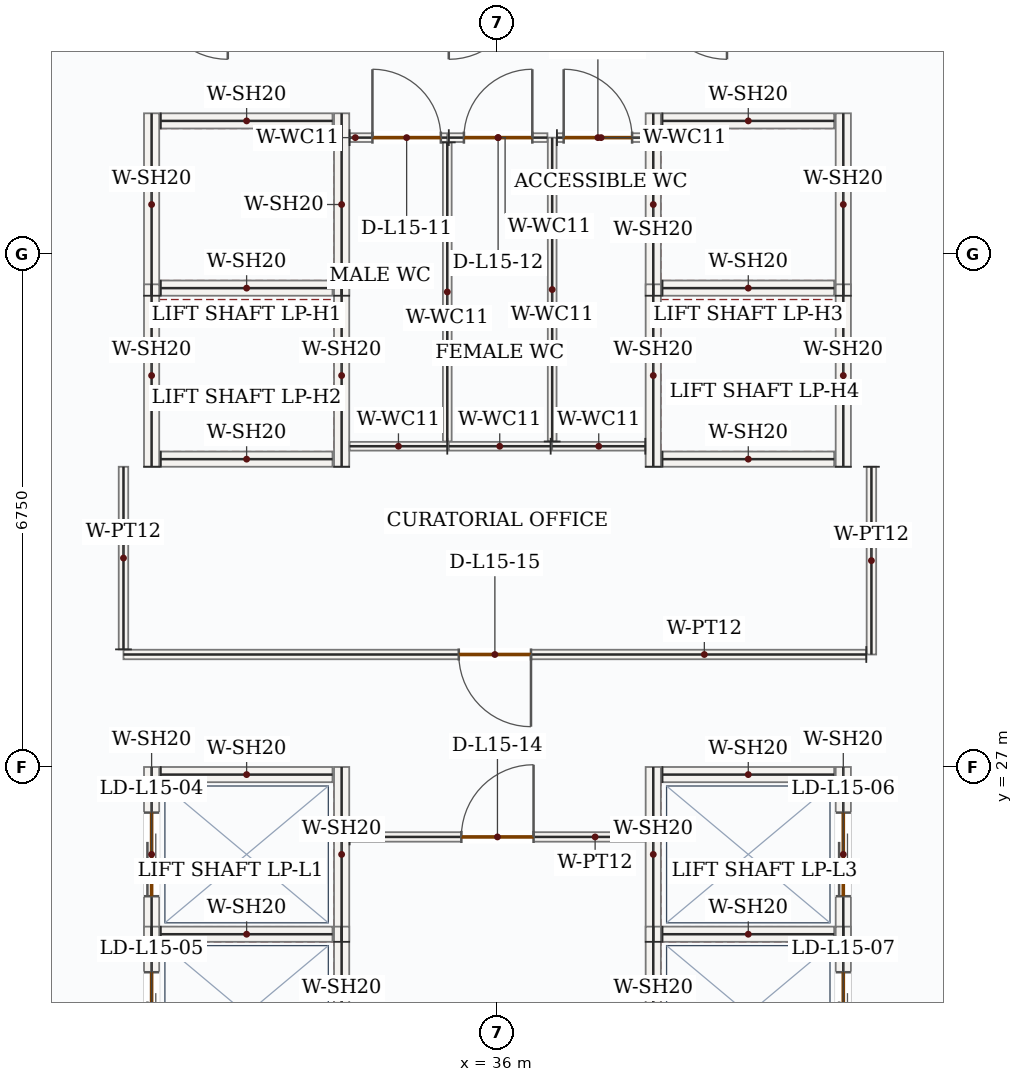
"""IFC4 building model, lengths in metres.
Left out: names, types, materials, properties, quantities, classifications, styles, units other than length and angle.
Written with IfcOpenShell. Run it as: python <this file> out.ifc"""

import sys

from ifc_helpers import new_model, si_unit, direction, frame, frame_2d, origin, place, context, subcontext, project, spatial, rectangle, extrude, source, transform, mapped, element, fill, save


model = new_model("IFC4")
c1 = context("Model", 3, precision=1e-05, world=origin(), true_north=direction((0.0, 1.0)))
c2 = subcontext(c1, "Body", "Model", "MODEL_VIEW")
j1 = project(units=[si_unit("LENGTHUNIT", "METRE"), si_unit("PLANEANGLEUNIT", "RADIAN")], contexts=[c1])
p1 = place(None, origin())
s1 = spatial("IfcSite", under=j1, at=p1, CompositionType="ELEMENT")
p2 = place(p1, origin())
s2 = spatial("IfcBuilding", under=s1, at=p2, CompositionType="ELEMENT")
p3 = place(p2, frame((0.0, 0.0, 71.1)))
s3 = spatial("IfcBuildingStorey", under=s2, at=p3, CompositionType="ELEMENT", Elevation=71.1)
m1 = source(origin(), c2, "Body", "SweptSolid", [
    extrude(rectangle(XDim=2.4, YDim=0.2, at=frame_2d((1.2, 0.0))), origin(), (0.0, 0.0, 1.0), 3.95),
])
for number, where, z_axis, x_axis in (
    (1, (31.45, 33.2, 0.0), (0.0, 0.0, 1.0), (0.0, 1.0, 0.0)),
    (2, (33.95, 33.2, 0.0), (0.0, 0.0, 1.0), (0.0, 1.0, 0.0)),
):
    element("IfcWall", number, at=place(p3, frame(where, z_axis=z_axis, x_axis=x_axis)), inside=s3, PredefinedType="SOLIDWALL", context=c2, shape_type="MappedRepresentation", body=[
        mapped(m1, transform((0.0, 0.0, 0.0), x_axis=(1.0, 0.0, 0.0), y_axis=(0.0, 1.0, 0.0), z_axis=(0.0, 0.0, 1.0), scale=1.0)),
    ])
m2 = source(origin(), c2, "Body", "SweptSolid", [
    extrude(rectangle(XDim=2.26, YDim=0.2, at=frame_2d((1.13, 0.0))), origin(), (0.0, 0.0, 1.0), 3.95),
])
for number, where, z_axis, x_axis in (
    (3, (31.57, 33.3, 0.0), (0.0, 0.0, 1.0), (1.0, 0.0, 0.0)),
    (4, (31.57, 35.5, 0.0), (0.0, 0.0, 1.0), (1.0, 0.0, 0.0)),
):
    element("IfcWall", number, at=place(p3, frame(where, z_axis=z_axis, x_axis=x_axis)), inside=s3, PredefinedType="SOLIDWALL", context=c2, shape_type="MappedRepresentation", body=[
        mapped(m2, transform((0.0, 0.0, 0.0), x_axis=(1.0, 0.0, 0.0), y_axis=(0.0, 1.0, 0.0), z_axis=(0.0, 0.0, 1.0), scale=1.0)),
    ])
for number, where, z_axis, x_axis in (
    (5, (31.45, 30.95, 0.0), (0.0, 0.0, 1.0), (0.0, 1.0, 0.0)),
    (6, (33.95, 30.95, 0.0), (0.0, 0.0, 1.0), (0.0, 1.0, 0.0)),
):
    element("IfcWall", number, at=place(p3, frame(where, z_axis=z_axis, x_axis=x_axis)), inside=s3, PredefinedType="SOLIDWALL", context=c2, shape_type="MappedRepresentation", body=[
        mapped(m1, transform((0.0, 0.0, 0.0), x_axis=(1.0, 0.0, 0.0), y_axis=(0.0, 1.0, 0.0), z_axis=(0.0, 0.0, 1.0), scale=1.0)),
    ])
p4 = place(p3, frame((31.57, 31.05, 0.0), z_axis=(0.0, 0.0, 1.0), x_axis=(1.0, 0.0, 0.0)))
e7 = element("IfcWall", 7, at=p4, inside=s3, PredefinedType="SOLIDWALL", context=c2, shape_type="MappedRepresentation", body=[
    mapped(m2, transform((0.0, 0.0, 0.0), x_axis=(1.0, 0.0, 0.0), y_axis=(0.0, 1.0, 0.0), z_axis=(0.0, 0.0, 1.0), scale=1.0)),
])
for number, where, z_axis, x_axis in (
    (8, (38.05, 33.2, 0.0), (0.0, 0.0, 1.0), (0.0, 1.0, 0.0)),
    (9, (40.55, 33.2, 0.0), (0.0, 0.0, 1.0), (0.0, 1.0, 0.0)),
):
    element("IfcWall", number, at=place(p3, frame(where, z_axis=z_axis, x_axis=x_axis)), inside=s3, PredefinedType="SOLIDWALL", context=c2, shape_type="MappedRepresentation", body=[
        mapped(m1, transform((0.0, 0.0, 0.0), x_axis=(1.0, 0.0, 0.0), y_axis=(0.0, 1.0, 0.0), z_axis=(0.0, 0.0, 1.0), scale=1.0)),
    ])
for number, where, z_axis, x_axis in (
    (10, (38.17, 33.3, 0.0), (0.0, 0.0, 1.0), (1.0, 0.0, 0.0)),
    (11, (38.17, 35.5, 0.0), (0.0, 0.0, 1.0), (1.0, 0.0, 0.0)),
):
    element("IfcWall", number, at=place(p3, frame(where, z_axis=z_axis, x_axis=x_axis)), inside=s3, PredefinedType="SOLIDWALL", context=c2, shape_type="MappedRepresentation", body=[
        mapped(m2, transform((0.0, 0.0, 0.0), x_axis=(1.0, 0.0, 0.0), y_axis=(0.0, 1.0, 0.0), z_axis=(0.0, 0.0, 1.0), scale=1.0)),
    ])
for number, where, z_axis, x_axis in (
    (12, (38.05, 30.95, 0.0), (0.0, 0.0, 1.0), (0.0, 1.0, 0.0)),
    (13, (40.55, 30.95, 0.0), (0.0, 0.0, 1.0), (0.0, 1.0, 0.0)),
):
    element("IfcWall", number, at=place(p3, frame(where, z_axis=z_axis, x_axis=x_axis)), inside=s3, PredefinedType="SOLIDWALL", context=c2, shape_type="MappedRepresentation", body=[
        mapped(m1, transform((0.0, 0.0, 0.0), x_axis=(1.0, 0.0, 0.0), y_axis=(0.0, 1.0, 0.0), z_axis=(0.0, 0.0, 1.0), scale=1.0)),
    ])
p5 = place(p3, frame((38.17, 31.05, 0.0), z_axis=(0.0, 0.0, 1.0), x_axis=(1.0, 0.0, 0.0)))
e14 = element("IfcWall", 14, at=p5, inside=s3, PredefinedType="SOLIDWALL", context=c2, shape_type="MappedRepresentation", body=[
    mapped(m2, transform((0.0, 0.0, 0.0), x_axis=(1.0, 0.0, 0.0), y_axis=(0.0, 1.0, 0.0), z_axis=(0.0, 0.0, 1.0), scale=1.0)),
])
p6 = place(p3, frame((31.45, 24.7, 0.0), z_axis=(0.0, 0.0, 1.0), x_axis=(0.0, 1.0, 0.0)))
e15 = element("IfcWall", 15, at=p6, inside=s3, PredefinedType="SOLIDWALL", context=c2, shape_type="SweptSolid", body=[
    extrude(rectangle(XDim=2.3, YDim=0.2, at=frame_2d((1.15, 0.0))), origin(), (0.0, 0.0, 1.0), 3.95),
])
p7 = place(p6, frame((0.6, 0.0, 0.0)))
e16 = element("IfcOpeningElement", 16, at=p7, cuts=e15, PredefinedType="OPENING", context=c2, shape_type="SweptSolid", body=[
    extrude(rectangle(XDim=1.1, YDim=2.15, at=frame_2d((0.55, 1.075))), frame((0.0, 0.11, 0.0), z_axis=(0.0, -1.0, 0.0), x_axis=(1.0, 0.0, 0.0)), (0.0, 0.0, 1.0), 0.22),
])
m3 = source(origin(), c2, "Body", "SweptSolid", [
    extrude(rectangle(XDim=2.3, YDim=0.2, at=frame_2d((1.15, 0.0))), origin(), (0.0, 0.0, 1.0), 3.95),
])
p8 = place(p3, frame((33.95, 24.7, 0.0), z_axis=(0.0, 0.0, 1.0), x_axis=(0.0, 1.0, 0.0)))
e17 = element("IfcWall", 17, at=p8, inside=s3, PredefinedType="SOLIDWALL", context=c2, shape_type="MappedRepresentation", body=[
    mapped(m3, transform((0.0, 0.0, 0.0), x_axis=(1.0, 0.0, 0.0), y_axis=(0.0, 1.0, 0.0), z_axis=(0.0, 0.0, 1.0), scale=1.0)),
])
for number, where, z_axis, x_axis in (
    (18, (31.57, 24.8, 0.0), (0.0, 0.0, 1.0), (1.0, 0.0, 0.0)),
    (19, (31.57, 26.9, 0.0), (0.0, 0.0, 1.0), (1.0, 0.0, 0.0)),
):
    element("IfcWall", number, at=place(p3, frame(where, z_axis=z_axis, x_axis=x_axis)), inside=s3, PredefinedType="SOLIDWALL", context=c2, shape_type="MappedRepresentation", body=[
        mapped(m2, transform((0.0, 0.0, 0.0), x_axis=(1.0, 0.0, 0.0), y_axis=(0.0, 1.0, 0.0), z_axis=(0.0, 0.0, 1.0), scale=1.0)),
    ])
p9 = place(p3, frame((31.45, 22.6, 0.0), z_axis=(0.0, 0.0, 1.0), x_axis=(0.0, 1.0, 0.0)))
e20 = element("IfcWall", 20, at=p9, inside=s3, PredefinedType="SOLIDWALL", context=c2, shape_type="SweptSolid", body=[
    extrude(rectangle(XDim=2.3, YDim=0.2, at=frame_2d((1.15, 0.0))), origin(), (0.0, 0.0, 1.0), 3.95),
])
p10 = place(p9, frame((0.6, 0.0, 0.0)))
e21 = element("IfcOpeningElement", 21, at=p10, cuts=e20, PredefinedType="OPENING", context=c2, shape_type="SweptSolid", body=[
    extrude(rectangle(XDim=1.1, YDim=2.15, at=frame_2d((0.55, 1.075))), frame((0.0, 0.11, 0.0), z_axis=(0.0, -1.0, 0.0), x_axis=(1.0, 0.0, 0.0)), (0.0, 0.0, 1.0), 0.22),
])
m4 = source(origin(), c2, "Body", "SweptSolid", [
    extrude(rectangle(XDim=2.3, YDim=0.2, at=frame_2d((1.15, 0.0))), origin(), (0.0, 0.0, 1.0), 3.95),
])
p11 = place(p3, frame((33.95, 22.6, 0.0), z_axis=(0.0, 0.0, 1.0), x_axis=(0.0, 1.0, 0.0)))
e22 = element("IfcWall", 22, at=p11, inside=s3, PredefinedType="SOLIDWALL", context=c2, shape_type="MappedRepresentation", body=[
    mapped(m4, transform((0.0, 0.0, 0.0), x_axis=(1.0, 0.0, 0.0), y_axis=(0.0, 1.0, 0.0), z_axis=(0.0, 0.0, 1.0), scale=1.0)),
])
p12 = place(p3, frame((38.05, 24.7, 0.0), z_axis=(0.0, 0.0, 1.0), x_axis=(0.0, 1.0, 0.0)))
e23 = element("IfcWall", 23, at=p12, inside=s3, PredefinedType="SOLIDWALL", context=c2, shape_type="MappedRepresentation", body=[
    mapped(m3, transform((0.0, 0.0, 0.0), x_axis=(1.0, 0.0, 0.0), y_axis=(0.0, 1.0, 0.0), z_axis=(0.0, 0.0, 1.0), scale=1.0)),
])
p13 = place(p3, frame((40.55, 24.7, 0.0), z_axis=(0.0, 0.0, 1.0), x_axis=(0.0, 1.0, 0.0)))
e24 = element("IfcWall", 24, at=p13, inside=s3, PredefinedType="SOLIDWALL", context=c2, shape_type="SweptSolid", body=[
    extrude(rectangle(XDim=2.3, YDim=0.2, at=frame_2d((1.15, 0.0))), origin(), (0.0, 0.0, 1.0), 3.95),
])
p14 = place(p13, frame((0.6, 0.0, 0.0)))
e25 = element("IfcOpeningElement", 25, at=p14, cuts=e24, PredefinedType="OPENING", context=c2, shape_type="SweptSolid", body=[
    extrude(rectangle(XDim=1.1, YDim=2.15, at=frame_2d((0.55, 1.075))), frame((0.0, 0.11, 0.0), z_axis=(0.0, -1.0, 0.0), x_axis=(1.0, 0.0, 0.0)), (0.0, 0.0, 1.0), 0.22),
])
for number, where, z_axis, x_axis in (
    (26, (38.17, 24.8, 0.0), (0.0, 0.0, 1.0), (1.0, 0.0, 0.0)),
    (27, (38.17, 26.9, 0.0), (0.0, 0.0, 1.0), (1.0, 0.0, 0.0)),
):
    element("IfcWall", number, at=place(p3, frame(where, z_axis=z_axis, x_axis=x_axis)), inside=s3, PredefinedType="SOLIDWALL", context=c2, shape_type="MappedRepresentation", body=[
        mapped(m2, transform((0.0, 0.0, 0.0), x_axis=(1.0, 0.0, 0.0), y_axis=(0.0, 1.0, 0.0), z_axis=(0.0, 0.0, 1.0), scale=1.0)),
    ])
p15 = place(p3, frame((38.05, 22.6, 0.0), z_axis=(0.0, 0.0, 1.0), x_axis=(0.0, 1.0, 0.0)))
e28 = element("IfcWall", 28, at=p15, inside=s3, PredefinedType="SOLIDWALL", context=c2, shape_type="MappedRepresentation", body=[
    mapped(m4, transform((0.0, 0.0, 0.0), x_axis=(1.0, 0.0, 0.0), y_axis=(0.0, 1.0, 0.0), z_axis=(0.0, 0.0, 1.0), scale=1.0)),
])
p16 = place(p3, frame((40.55, 22.6, 0.0), z_axis=(0.0, 0.0, 1.0), x_axis=(0.0, 1.0, 0.0)))
e29 = element("IfcWall", 29, at=p16, inside=s3, PredefinedType="SOLIDWALL", context=c2, shape_type="SweptSolid", body=[
    extrude(rectangle(XDim=2.3, YDim=0.2, at=frame_2d((1.15, 0.0))), origin(), (0.0, 0.0, 1.0), 3.95),
])
p17 = place(p16, frame((0.6, 0.0, 0.0)))
e30 = element("IfcOpeningElement", 30, at=p17, cuts=e29, PredefinedType="OPENING", context=c2, shape_type="SweptSolid", body=[
    extrude(rectangle(XDim=1.1, YDim=2.15, at=frame_2d((0.55, 1.075))), frame((0.0, 0.11, 0.0), z_axis=(0.0, -1.0, 0.0), x_axis=(1.0, 0.0, 0.0)), (0.0, 0.0, 1.0), 0.22),
])
m5 = source(origin(), c2, "Body", "SweptSolid", [
    extrude(rectangle(XDim=1.225, YDim=0.115, at=frame_2d((0.613, 0.0))), origin(), (0.0, 0.0, 1.0), 3.95),
])
p18 = place(p3, frame((37.945, 31.22, 0.0), z_axis=(0.0, 0.0, 1.0), x_axis=(-1.0, 0.0, 0.0)))
e31 = element("IfcWall", 31, at=p18, inside=s3, PredefinedType="PARTITIONING", context=c2, shape_type="MappedRepresentation", body=[
    mapped(m5, transform((0.0, 0.0, 0.0), x_axis=(1.0, 0.0, 0.0), y_axis=(0.0, 1.0, 0.0), z_axis=(0.0, 0.0, 1.0), scale=1.0)),
])
m6 = source(origin(), c2, "Body", "SweptSolid", [
    extrude(rectangle(XDim=3.998, YDim=0.115, at=frame_2d((1.999, 0.0))), origin(), (0.0, 0.0, 1.0), 3.95),
])
p19 = place(p3, frame((36.72, 31.282, 0.0), z_axis=(0.0, 0.0, 1.0), x_axis=(0.0, 1.0, 0.0)))
e32 = element("IfcWall", 32, at=p19, inside=s3, PredefinedType="PARTITIONING", context=c2, shape_type="MappedRepresentation", body=[
    mapped(m6, transform((0.0, 0.0, 0.0), x_axis=(1.0, 0.0, 0.0), y_axis=(0.0, 1.0, 0.0), z_axis=(0.0, 0.0, 1.0), scale=1.0)),
])
p20 = place(p3, frame((36.782, 35.28, 0.0), z_axis=(0.0, 0.0, 1.0), x_axis=(1.0, 0.0, 0.0)))
e33 = element("IfcWall", 33, at=p20, inside=s3, PredefinedType="PARTITIONING", context=c2, shape_type="SweptSolid", body=[
    extrude(rectangle(XDim=1.163, YDim=0.115, at=frame_2d((0.581, 0.0))), origin(), (0.0, 0.0, 1.0), 3.95),
])
p21 = place(p20, frame((0.089, 0.0, 0.0)))
e34 = element("IfcOpeningElement", 34, at=p21, cuts=e33, PredefinedType="OPENING", context=c2, shape_type="SweptSolid", body=[
    extrude(rectangle(XDim=0.9, YDim=2.1, at=frame_2d((0.45, 1.05))), frame((0.0, 0.067, 0.0), z_axis=(0.0, -1.0, 0.0), x_axis=(1.0, 0.0, 0.0)), (0.0, 0.0, 1.0), 0.135),
])
m7 = source(origin(), c2, "Body", "SweptSolid", [
    extrude(rectangle(XDim=1.285, YDim=0.115, at=frame_2d((0.643, 0.0))), origin(), (0.0, 0.0, 1.0), 3.95),
])
p22 = place(p3, frame((35.34, 31.22, 0.0), z_axis=(0.0, 0.0, 1.0), x_axis=(-1.0, 0.0, 0.0)))
e35 = element("IfcWall", 35, at=p22, inside=s3, PredefinedType="PARTITIONING", context=c2, shape_type="MappedRepresentation", body=[
    mapped(m7, transform((0.0, 0.0, 0.0), x_axis=(1.0, 0.0, 0.0), y_axis=(0.0, 1.0, 0.0), z_axis=(0.0, 0.0, 1.0), scale=1.0)),
])
p23 = place(p3, frame((34.055, 35.28, 0.0), z_axis=(0.0, 0.0, 1.0), x_axis=(1.0, 0.0, 0.0)))
e36 = element("IfcWall", 36, at=p23, inside=s3, PredefinedType="PARTITIONING", context=c2, shape_type="SweptSolid", body=[
    extrude(rectangle(XDim=1.285, YDim=0.115, at=frame_2d((0.643, 0.0))), origin(), (0.0, 0.0, 1.0), 3.95),
])
p24 = place(p23, frame((0.3, 0.0, 0.0)))
e37 = element("IfcOpeningElement", 37, at=p24, cuts=e36, PredefinedType="OPENING", context=c2, shape_type="SweptSolid", body=[
    extrude(rectangle(XDim=0.9, YDim=2.1, at=frame_2d((0.45, 1.05))), frame((0.0, 0.067, 0.0), z_axis=(0.0, -1.0, 0.0), x_axis=(1.0, 0.0, 0.0)), (0.0, 0.0, 1.0), 0.135),
])
m8 = source(origin(), c2, "Body", "SweptSolid", [
    extrude(rectangle(XDim=3.935, YDim=0.115, at=frame_2d((1.968, 0.0))), origin(), (0.0, 0.0, 1.0), 3.95),
])
p25 = place(p3, frame((35.34, 35.218, 0.0), z_axis=(0.0, 0.0, 1.0), x_axis=(0.0, -1.0, 0.0)))
e38 = element("IfcWall", 38, at=p25, inside=s3, PredefinedType="PARTITIONING", context=c2, shape_type="MappedRepresentation", body=[
    mapped(m8, transform((0.0, 0.0, 0.0), x_axis=(1.0, 0.0, 0.0), y_axis=(0.0, 1.0, 0.0), z_axis=(0.0, 0.0, 1.0), scale=1.0)),
])
m9 = source(origin(), c2, "Body", "SweptSolid", [
    extrude(rectangle(XDim=1.34, YDim=0.115, at=frame_2d((0.67, 0.0))), origin(), (0.0, 0.0, 1.0), 3.95),
])
p26 = place(p3, frame((36.7, 31.22, 0.0), z_axis=(0.0, 0.0, 1.0), x_axis=(-1.0, 0.0, 0.0)))
e39 = element("IfcWall", 39, at=p26, inside=s3, PredefinedType="PARTITIONING", context=c2, shape_type="MappedRepresentation", body=[
    mapped(m9, transform((0.0, 0.0, 0.0), x_axis=(1.0, 0.0, 0.0), y_axis=(0.0, 1.0, 0.0), z_axis=(0.0, 0.0, 1.0), scale=1.0)),
])
p27 = place(p3, frame((35.36, 35.28, 0.0), z_axis=(0.0, 0.0, 1.0), x_axis=(1.0, 0.0, 0.0)))
e40 = element("IfcWall", 40, at=p27, inside=s3, PredefinedType="PARTITIONING", context=c2, shape_type="SweptSolid", body=[
    extrude(rectangle(XDim=1.297, YDim=0.115, at=frame_2d((0.649, 0.0))), origin(), (0.0, 0.0, 1.0), 3.95),
])
p28 = place(p27, frame((0.199, 0.0, 0.0)))
e41 = element("IfcOpeningElement", 41, at=p28, cuts=e40, PredefinedType="OPENING", context=c2, shape_type="SweptSolid", body=[
    extrude(rectangle(XDim=0.9, YDim=2.1, at=frame_2d((0.45, 1.05))), frame((0.0, 0.067, 0.0), z_axis=(0.0, -1.0, 0.0), x_axis=(1.0, 0.0, 0.0)), (0.0, 0.0, 1.0), 0.135),
])
p29 = place(p3, frame((34.055, 26.08, 0.0), z_axis=(0.0, 0.0, 1.0), x_axis=(1.0, 0.0, 0.0)))
e42 = element("IfcWall", 42, at=p29, inside=s3, PredefinedType="PARTITIONING", context=c2, shape_type="SweptSolid", body=[
    extrude(rectangle(XDim=3.89, YDim=0.125, at=frame_2d((1.945, 0.0))), origin(), (0.0, 0.0, 1.0), 3.95),
])
p30 = place(p29, frame((1.47, 0.0, 0.0)))
e43 = element("IfcOpeningElement", 43, at=p30, cuts=e42, PredefinedType="OPENING", context=c2, shape_type="SweptSolid", body=[
    extrude(rectangle(XDim=0.95, YDim=2.15, at=frame_2d((0.475, 1.075))), frame((0.0, 0.073, 0.0), z_axis=(0.0, -1.0, 0.0), x_axis=(1.0, 0.0, 0.0)), (0.0, 0.0, 1.0), 0.145),
])
m10 = source(origin(), c2, "Body", "SweptSolid", [
    extrude(rectangle(XDim=2.47, YDim=0.125, at=frame_2d((1.235, 0.0))), origin(), (0.0, 0.0, 1.0), 3.95),
])
p31 = place(p3, frame((40.92, 30.95, 0.0), z_axis=(0.0, 0.0, 1.0), x_axis=(0.0, -1.0, 0.0)))
e44 = element("IfcWall", 44, at=p31, inside=s3, PredefinedType="PARTITIONING", context=c2, shape_type="MappedRepresentation", body=[
    mapped(m10, transform((0.0, 0.0, 0.0), x_axis=(1.0, 0.0, 0.0), y_axis=(0.0, 1.0, 0.0), z_axis=(0.0, 0.0, 1.0), scale=1.0)),
])
p32 = place(p3, frame((40.853, 28.48, 0.0), z_axis=(0.0, 0.0, 1.0), x_axis=(-1.0, 0.0, 0.0)))
e45 = element("IfcWall", 45, at=p32, inside=s3, PredefinedType="PARTITIONING", context=c2, shape_type="SweptSolid", body=[
    extrude(rectangle(XDim=9.772, YDim=0.125, at=frame_2d((4.886, 0.0))), origin(), (0.0, 0.0, 1.0), 3.95),
])
p33 = place(p32, frame((4.411, 0.0, 0.0)))
e46 = element("IfcOpeningElement", 46, at=p33, cuts=e45, PredefinedType="OPENING", context=c2, shape_type="SweptSolid", body=[
    extrude(rectangle(XDim=0.95, YDim=2.15, at=frame_2d((0.475, 1.075))), frame((0.0, 0.073, 0.0), z_axis=(0.0, -1.0, 0.0), x_axis=(1.0, 0.0, 0.0)), (0.0, 0.0, 1.0), 0.145),
])
m11 = source(origin(), c2, "Body", "SweptSolid", [
    extrude(rectangle(XDim=2.402, YDim=0.125, at=frame_2d((1.201, 0.0))), origin(), (0.0, 0.0, 1.0), 3.95),
])
p34 = place(p3, frame((31.08, 28.548, 0.0), z_axis=(0.0, 0.0, 1.0), x_axis=(0.0, 1.0, 0.0)))
e47 = element("IfcWall", 47, at=p34, inside=s3, PredefinedType="PARTITIONING", context=c2, shape_type="MappedRepresentation", body=[
    mapped(m11, transform((0.0, 0.0, 0.0), x_axis=(1.0, 0.0, 0.0), y_axis=(0.0, 1.0, 0.0), z_axis=(0.0, 0.0, 1.0), scale=1.0)),
])
m12 = source(origin(), c2, "Body", "SweptSolid", [
    extrude(rectangle(XDim=1.1, YDim=2.15, at=frame_2d((0.55, 1.075))), frame((0.0, 0.025, 0.0), z_axis=(0.0, -1.0, 0.0), x_axis=(1.0, 0.0, 0.0)), (0.0, 0.0, 1.0), 0.05),
])
p35 = place(p7, origin())
e48 = element("IfcDoor", 48, at=p35, inside=s3, OperationType="DOUBLE_DOOR_SLIDING", PredefinedType="DOOR", context=c2, shape_type="MappedRepresentation", body=[
    mapped(m12, transform((0.0, 0.0, 0.0), x_axis=(1.0, 0.0, 0.0), y_axis=(0.0, 1.0, 0.0), z_axis=(0.0, 0.0, 1.0), scale=1.0)),
])
fill(e16, e48)
p36 = place(p10, origin())
e49 = element("IfcDoor", 49, at=p36, inside=s3, OperationType="DOUBLE_DOOR_SLIDING", PredefinedType="DOOR", context=c2, shape_type="MappedRepresentation", body=[
    mapped(m12, transform((0.0, 0.0, 0.0), x_axis=(1.0, 0.0, 0.0), y_axis=(0.0, 1.0, 0.0), z_axis=(0.0, 0.0, 1.0), scale=1.0)),
])
fill(e21, e49)
p37 = place(p14, origin())
e50 = element("IfcDoor", 50, at=p37, inside=s3, OperationType="DOUBLE_DOOR_SLIDING", PredefinedType="DOOR", context=c2, shape_type="MappedRepresentation", body=[
    mapped(m12, transform((0.0, 0.0, 0.0), x_axis=(1.0, 0.0, 0.0), y_axis=(0.0, 1.0, 0.0), z_axis=(0.0, 0.0, 1.0), scale=1.0)),
])
fill(e25, e50)
p38 = place(p17, origin())
e51 = element("IfcDoor", 51, at=p38, inside=s3, OperationType="DOUBLE_DOOR_SLIDING", PredefinedType="DOOR", context=c2, shape_type="MappedRepresentation", body=[
    mapped(m12, transform((0.0, 0.0, 0.0), x_axis=(1.0, 0.0, 0.0), y_axis=(0.0, 1.0, 0.0), z_axis=(0.0, 0.0, 1.0), scale=1.0)),
])
fill(e30, e51)
m13 = source(origin(), c2, "Body", "SweptSolid", [
    extrude(rectangle(XDim=0.9, YDim=2.1, at=frame_2d((0.45, 1.05))), frame((0.0, 0.025, 0.0), z_axis=(0.0, -1.0, 0.0), x_axis=(1.0, 0.0, 0.0)), (0.0, 0.0, 1.0), 0.05),
])
p39 = place(p24, origin())
e52 = element("IfcDoor", 52, at=p39, inside=s3, OperationType="SINGLE_SWING_LEFT", PredefinedType="DOOR", context=c2, shape_type="MappedRepresentation", body=[
    mapped(m13, transform((0.0, 0.0, 0.0), x_axis=(1.0, 0.0, 0.0), y_axis=(0.0, 1.0, 0.0), z_axis=(0.0, 0.0, 1.0), scale=1.0)),
])
fill(e37, e52)
p40 = place(p28, origin())
e53 = element("IfcDoor", 53, at=p40, inside=s3, OperationType="SINGLE_SWING_RIGHT", PredefinedType="DOOR", context=c2, shape_type="MappedRepresentation", body=[
    mapped(m13, transform((0.0, 0.0, 0.0), x_axis=(1.0, 0.0, 0.0), y_axis=(0.0, 1.0, 0.0), z_axis=(0.0, 0.0, 1.0), scale=1.0)),
])
fill(e41, e53)
p41 = place(p21, origin())
e54 = element("IfcDoor", 54, at=p41, inside=s3, OperationType="SINGLE_SWING_LEFT", PredefinedType="DOOR", context=c2, shape_type="MappedRepresentation", body=[
    mapped(m13, transform((0.0, 0.0, 0.0), x_axis=(1.0, 0.0, 0.0), y_axis=(0.0, 1.0, 0.0), z_axis=(0.0, 0.0, 1.0), scale=1.0)),
])
fill(e34, e54)
m14 = source(origin(), c2, "Body", "SweptSolid", [
    extrude(rectangle(XDim=0.95, YDim=2.15, at=frame_2d((0.475, 1.075))), frame((0.0, 0.025, 0.0), z_axis=(0.0, -1.0, 0.0), x_axis=(1.0, 0.0, 0.0)), (0.0, 0.0, 1.0), 0.05),
])
p42 = place(p30, origin())
e55 = element("IfcDoor", 55, at=p42, inside=s3, OperationType="SINGLE_SWING_RIGHT", PredefinedType="DOOR", context=c2, shape_type="MappedRepresentation", body=[
    mapped(m14, transform((0.0, 0.0, 0.0), x_axis=(1.0, 0.0, 0.0), y_axis=(0.0, 1.0, 0.0), z_axis=(0.0, 0.0, 1.0), scale=1.0)),
])
fill(e43, e55)
p43 = place(p33, origin())
e56 = element("IfcDoor", 56, at=p43, inside=s3, OperationType="SINGLE_SWING_LEFT", PredefinedType="DOOR", context=c2, shape_type="MappedRepresentation", body=[
    mapped(m14, transform((0.0, 0.0, 0.0), x_axis=(1.0, 0.0, 0.0), y_axis=(0.0, 1.0, 0.0), z_axis=(0.0, 0.0, 1.0), scale=1.0)),
])
fill(e46, e56)
save(model, sys.argv[1])
